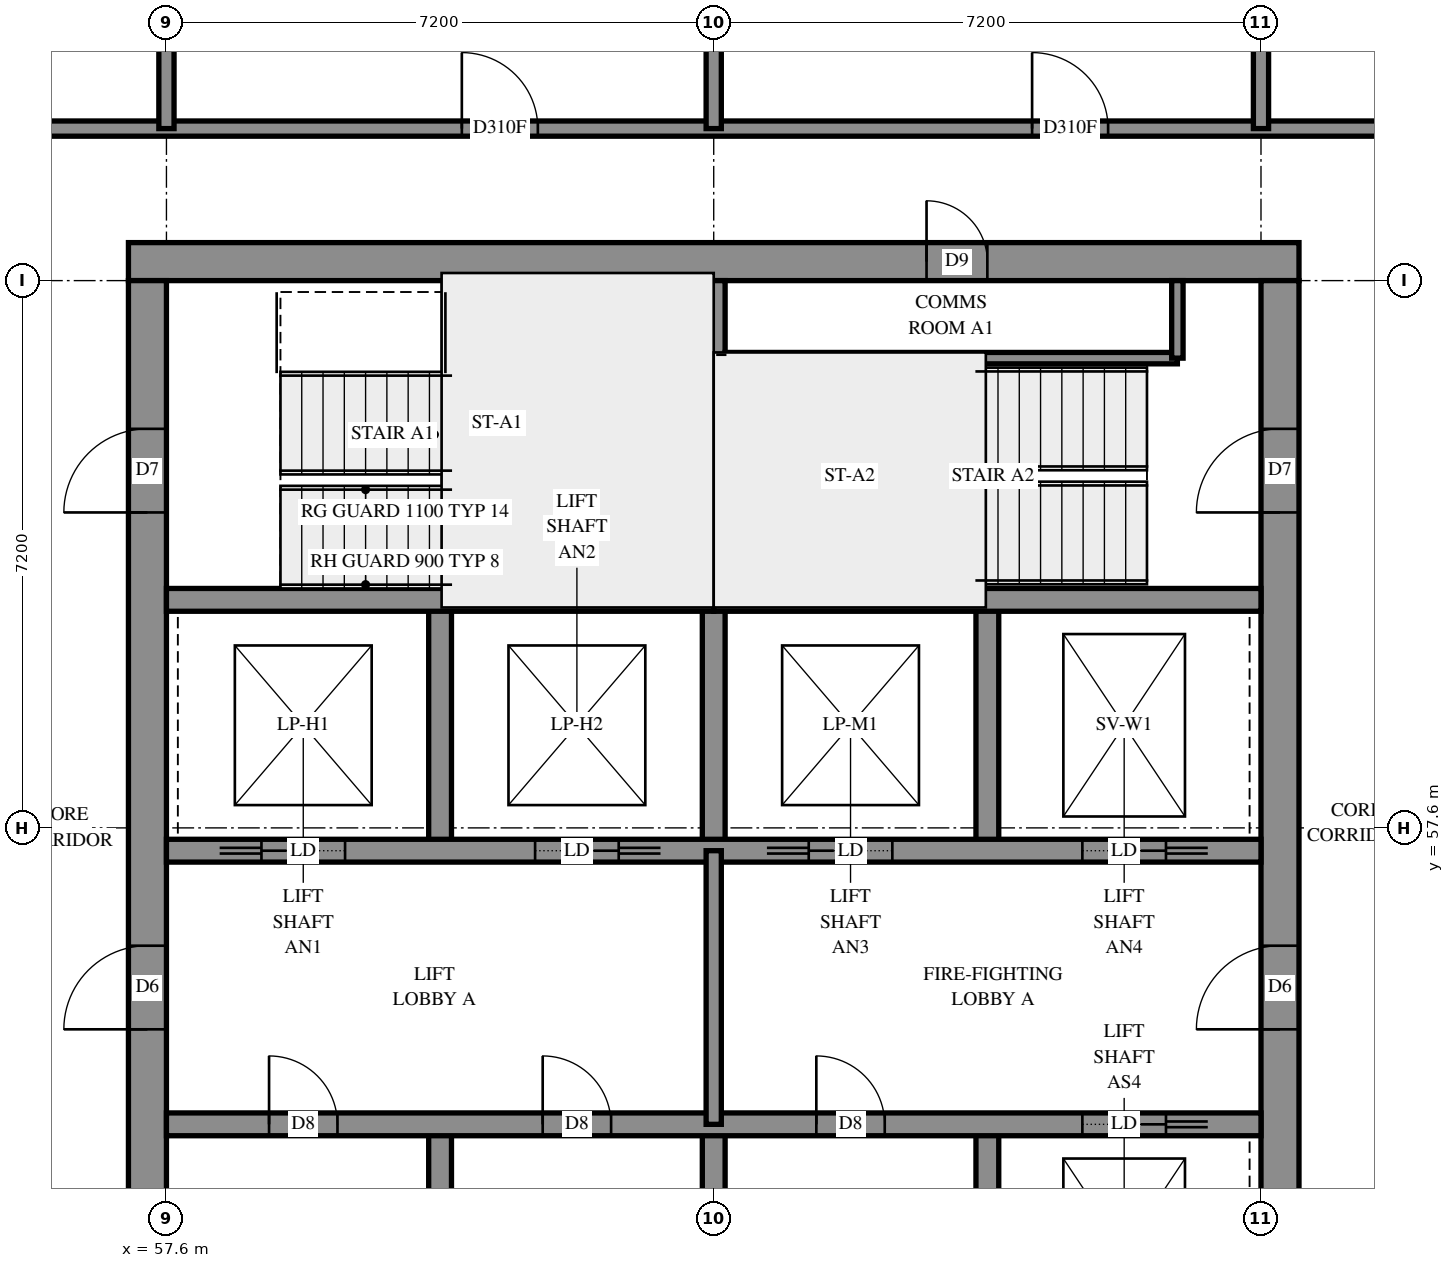
"""IFC4 building model, lengths in metres.
Left out: names, types, materials, properties, quantities, classifications, styles, units other than length and angle.
Written with IfcOpenShell. Run it as: python <this file> out.ifc"""

import sys

from ifc_helpers import new_model, si_unit, direction, frame, frame_2d, origin, place, context, subcontext, project, spatial, rectangle, extrude, element, fill, save


model = new_model("IFC4")
c1 = context("Model", 3, precision=1e-05, world=origin(), true_north=direction((0.0, 1.0)))
c2 = subcontext(c1, "Body", "Model", "MODEL_VIEW")
j1 = project(units=[si_unit("LENGTHUNIT", "METRE"), si_unit("PLANEANGLEUNIT", "RADIAN")], contexts=[c1])
p1 = place(None, origin())
s1 = spatial("IfcSite", under=j1, at=p1, CompositionType="ELEMENT")
p2 = place(p1, origin())
s2 = spatial("IfcBuilding", under=s1, at=p2, CompositionType="ELEMENT")
p3 = place(p2, frame((0.0, 0.0, 189.6)))
s3 = spatial("IfcBuildingStorey", under=s2, at=p3, CompositionType="ELEMENT", Elevation=189.6)
p4 = place(p3, frame((57.1, 65.05, -0.3), z_axis=(0.0, 0.0, 1.0), x_axis=(1.0, 0.0, 0.0)))
e1 = element("IfcWall", 1, at=p4, inside=s3, PredefinedType="SHEAR", context=c2, shape_type="SweptSolid", body=[
    extrude(rectangle(XDim=15.4, YDim=0.5, at=frame_2d((7.7, 0.0))), origin(), (0.0, 0.0, 1.0), 2.7),
])
p5 = place(p4, frame((10.5, 0.0, 0.3)))
e2 = element("IfcOpeningElement", 2, at=p5, cuts=e1, PredefinedType="OPENING", context=c2, shape_type="SweptSolid", body=[
    extrude(rectangle(XDim=0.8, YDim=2.1, at=frame_2d((0.4, 1.05))), frame((0.0, 0.26, 0.0), z_axis=(0.0, -1.0, 0.0), x_axis=(1.0, 0.0, 0.0)), (0.0, 0.0, 1.0), 0.52),
])
p6 = place(p3, frame((57.35, 50.4, -0.3), z_axis=(0.0, 0.0, 1.0), x_axis=(0.0, 1.0, 0.0)))
e3 = element("IfcWall", 3, at=p6, inside=s3, PredefinedType="SHEAR", context=c2, shape_type="SweptSolid", body=[
    extrude(rectangle(XDim=14.4, YDim=0.5, at=frame_2d((7.2, 0.0))), origin(), (0.0, 0.0, 1.0), 2.7),
])
p7 = place(p6, frame((4.55, 0.0, 0.3)))
e4 = element("IfcOpeningElement", 4, at=p7, cuts=e3, PredefinedType="OPENING", context=c2, shape_type="SweptSolid", body=[
    extrude(rectangle(XDim=1.1, YDim=2.1, at=frame_2d((0.55, 1.05))), frame((0.0, 0.26, 0.0), z_axis=(0.0, -1.0, 0.0), x_axis=(1.0, 0.0, 0.0)), (0.0, 0.0, 1.0), 0.52),
])
p8 = place(p6, frame((11.35, 0.0, 0.3)))
e5 = element("IfcOpeningElement", 5, at=p8, cuts=e3, PredefinedType="OPENING", context=c2, shape_type="SweptSolid", body=[
    extrude(rectangle(XDim=1.1, YDim=2.1, at=frame_2d((0.55, 1.05))), frame((0.0, 0.26, 0.0), z_axis=(0.0, -1.0, 0.0), x_axis=(1.0, 0.0, 0.0)), (0.0, 0.0, 1.0), 0.52),
])
p9 = place(p3, frame((72.25, 50.4, -0.3), z_axis=(0.0, 0.0, 1.0), x_axis=(0.0, 1.0, 0.0)))
e6 = element("IfcWall", 6, at=p9, inside=s3, PredefinedType="SHEAR", context=c2, shape_type="SweptSolid", body=[
    extrude(rectangle(XDim=14.4, YDim=0.5, at=frame_2d((7.2, 0.0))), origin(), (0.0, 0.0, 1.0), 2.7),
])
p10 = place(p9, frame((4.55, 0.0, 0.3)))
e7 = element("IfcOpeningElement", 7, at=p10, cuts=e6, PredefinedType="OPENING", context=c2, shape_type="SweptSolid", body=[
    extrude(rectangle(XDim=1.1, YDim=2.1, at=frame_2d((0.55, 1.05))), frame((0.0, 0.26, 0.0), z_axis=(0.0, -1.0, 0.0), x_axis=(1.0, 0.0, 0.0)), (0.0, 0.0, 1.0), 0.52),
])
p11 = place(p9, frame((11.35, 0.0, 0.3)))
e8 = element("IfcOpeningElement", 8, at=p11, cuts=e6, PredefinedType="OPENING", context=c2, shape_type="SweptSolid", body=[
    extrude(rectangle(XDim=1.1, YDim=2.1, at=frame_2d((0.55, 1.05))), frame((0.0, 0.26, 0.0), z_axis=(0.0, -1.0, 0.0), x_axis=(1.0, 0.0, 0.0)), (0.0, 0.0, 1.0), 0.52),
])
for number, where, z_axis, x_axis in (
    (9, (61.2, 50.4, 0.0), (0.0, 0.0, 1.0), (0.0, 1.0, 0.0)),
    (10, (61.2, 57.3, 0.0), (0.0, 0.0, 1.0), (0.0, 1.0, 0.0)),
    (11, (64.8, 50.4, 0.0), (0.0, 0.0, 1.0), (0.0, 1.0, 0.0)),
    (12, (64.8, 57.3, 0.0), (0.0, 0.0, 1.0), (0.0, 1.0, 0.0)),
    (13, (68.4, 50.4, 0.0), (0.0, 0.0, 1.0), (0.0, 1.0, 0.0)),
    (14, (68.4, 57.3, 0.0), (0.0, 0.0, 1.0), (0.0, 1.0, 0.0)),
):
    element("IfcWall", number, at=place(p3, frame(where, z_axis=z_axis, x_axis=x_axis)), inside=s3, PredefinedType="SOLIDWALL", context=c2, shape_type="SweptSolid", body=[
        extrude(rectangle(XDim=3.3, YDim=0.3, at=frame_2d((1.65, 0.0))), origin(), (0.0, 0.0, 1.0), 3.1),
    ])
p12 = place(p3, frame((57.6, 53.7, 0.0), z_axis=(0.0, 0.0, 1.0), x_axis=(1.0, 0.0, 0.0)))
e15 = element("IfcWall", 15, at=p12, inside=s3, PredefinedType="SOLIDWALL", context=c2, shape_type="SweptSolid", body=[
    extrude(rectangle(XDim=14.4, YDim=0.3, at=frame_2d((7.2, 0.0))), origin(), (0.0, 0.0, 1.0), 3.1),
])
p13 = place(p12, frame((1.35, 0.0, 0.0)))
e16 = element("IfcOpeningElement", 16, at=p13, cuts=e15, PredefinedType="OPENING", context=c2, shape_type="SweptSolid", body=[
    extrude(rectangle(XDim=0.9, YDim=2.1, at=frame_2d((0.45, 1.05))), frame((0.0, 0.16, 0.0), z_axis=(0.0, -1.0, 0.0), x_axis=(1.0, 0.0, 0.0)), (0.0, 0.0, 1.0), 0.32),
])
p14 = place(p12, frame((4.95, 0.0, 0.0)))
e17 = element("IfcOpeningElement", 17, at=p14, cuts=e15, PredefinedType="OPENING", context=c2, shape_type="SweptSolid", body=[
    extrude(rectangle(XDim=0.9, YDim=2.1, at=frame_2d((0.45, 1.05))), frame((0.0, 0.16, 0.0), z_axis=(0.0, -1.0, 0.0), x_axis=(1.0, 0.0, 0.0)), (0.0, 0.0, 1.0), 0.32),
])
p15 = place(p12, frame((8.55, 0.0, 0.0)))
e18 = element("IfcOpeningElement", 18, at=p15, cuts=e15, PredefinedType="OPENING", context=c2, shape_type="SweptSolid", body=[
    extrude(rectangle(XDim=0.9, YDim=2.1, at=frame_2d((0.45, 1.05))), frame((0.0, 0.16, 0.0), z_axis=(0.0, -1.0, 0.0), x_axis=(1.0, 0.0, 0.0)), (0.0, 0.0, 1.0), 0.32),
])
p16 = place(p12, frame((12.05, 0.0, 0.0)))
e19 = element("IfcOpeningElement", 19, at=p16, cuts=e15, PredefinedType="OPENING", context=c2, shape_type="SweptSolid", body=[
    extrude(rectangle(XDim=1.1, YDim=2.1, at=frame_2d((0.55, 1.05))), frame((0.0, 0.16, 0.0), z_axis=(0.0, -1.0, 0.0), x_axis=(1.0, 0.0, 0.0)), (0.0, 0.0, 1.0), 0.32),
])
p17 = place(p3, frame((57.6, 57.3, 0.0), z_axis=(0.0, 0.0, 1.0), x_axis=(1.0, 0.0, 0.0)))
e20 = element("IfcWall", 20, at=p17, inside=s3, PredefinedType="SOLIDWALL", context=c2, shape_type="SweptSolid", body=[
    extrude(rectangle(XDim=14.4, YDim=0.3, at=frame_2d((7.2, 0.0))), origin(), (0.0, 0.0, 1.0), 3.1),
])
p18 = place(p17, frame((1.25, 0.0, 0.0)))
e21 = element("IfcOpeningElement", 21, at=p18, cuts=e20, PredefinedType="OPENING", context=c2, shape_type="SweptSolid", body=[
    extrude(rectangle(XDim=1.1, YDim=2.1, at=frame_2d((0.55, 1.05))), frame((0.0, 0.16, 0.0), z_axis=(0.0, -1.0, 0.0), x_axis=(1.0, 0.0, 0.0)), (0.0, 0.0, 1.0), 0.32),
])
p19 = place(p17, frame((4.85, 0.0, 0.0)))
e22 = element("IfcOpeningElement", 22, at=p19, cuts=e20, PredefinedType="OPENING", context=c2, shape_type="SweptSolid", body=[
    extrude(rectangle(XDim=1.1, YDim=2.1, at=frame_2d((0.55, 1.05))), frame((0.0, 0.16, 0.0), z_axis=(0.0, -1.0, 0.0), x_axis=(1.0, 0.0, 0.0)), (0.0, 0.0, 1.0), 0.32),
])
p20 = place(p17, frame((8.45, 0.0, 0.0)))
e23 = element("IfcOpeningElement", 23, at=p20, cuts=e20, PredefinedType="OPENING", context=c2, shape_type="SweptSolid", body=[
    extrude(rectangle(XDim=1.1, YDim=2.1, at=frame_2d((0.55, 1.05))), frame((0.0, 0.16, 0.0), z_axis=(0.0, -1.0, 0.0), x_axis=(1.0, 0.0, 0.0)), (0.0, 0.0, 1.0), 0.32),
])
p21 = place(p17, frame((12.05, 0.0, 0.0)))
e24 = element("IfcOpeningElement", 24, at=p21, cuts=e20, PredefinedType="OPENING", context=c2, shape_type="SweptSolid", body=[
    extrude(rectangle(XDim=1.1, YDim=2.1, at=frame_2d((0.55, 1.05))), frame((0.0, 0.16, 0.0), z_axis=(0.0, -1.0, 0.0), x_axis=(1.0, 0.0, 0.0)), (0.0, 0.0, 1.0), 0.32),
])
for number, where, z_axis, x_axis in (
    (25, (57.6, 60.6, 0.0), (0.0, 0.0, 1.0), (1.0, 0.0, 0.0)),
    (26, (64.8, 60.6, 0.0), (0.0, 0.0, 1.0), (1.0, 0.0, 0.0)),
):
    element("IfcWall", number, at=place(p3, frame(where, z_axis=z_axis, x_axis=x_axis)), inside=s3, PredefinedType="SOLIDWALL", context=c2, shape_type="SweptSolid", body=[
        extrude(rectangle(XDim=7.2, YDim=0.3, at=frame_2d((3.6, 0.0))), origin(), (0.0, 0.0, 1.0), 3.1),
    ])
p22 = place(p3, frame((64.8, 60.6, 0.0), z_axis=(0.0, 0.0, 1.0), x_axis=(0.0, 1.0, 0.0)))
e27 = element("IfcWall", 27, at=p22, inside=s3, PredefinedType="SOLIDWALL", context=c2, shape_type="SweptSolid", body=[
    extrude(rectangle(XDim=4.2, YDim=0.3, at=frame_2d((2.1, 0.0))), origin(), (0.0, 0.0, 1.0), 3.1),
])
p23 = place(p3, frame((64.95, 63.78, 0.0), z_axis=(0.0, 0.0, 1.0), x_axis=(1.0, 0.0, 0.0)))
e28 = element("IfcWall", 28, at=p23, inside=s3, PredefinedType="PARTITIONING", context=c2, shape_type="SweptSolid", body=[
    extrude(rectangle(XDim=5.95, YDim=0.15, at=frame_2d((2.975, 0.0))), origin(), (0.0, 0.0, 1.0), 3.1),
])
p24 = place(p3, frame((70.9, 63.78, 0.0), z_axis=(0.0, 0.0, 1.0), x_axis=(0.0, 1.0, 0.0)))
e29 = element("IfcWall", 29, at=p24, inside=s3, PredefinedType="PARTITIONING", context=c2, shape_type="SweptSolid", body=[
    extrude(rectangle(XDim=1.02, YDim=0.15, at=frame_2d((0.51, 0.0))), origin(), (0.0, 0.0, 1.0), 3.1),
])
p25 = place(p3, frame((64.8, 53.7, 0.0), z_axis=(0.0, 0.0, 1.0), x_axis=(0.0, 1.0, 0.0)))
e30 = element("IfcWall", 30, at=p25, inside=s3, PredefinedType="PARTITIONING", context=c2, shape_type="SweptSolid", body=[
    extrude(rectangle(XDim=3.6, YDim=0.2, at=frame_2d((1.8, 0.0))), origin(), (0.0, 0.0, 1.0), 3.1),
])
p26 = place(p3, frame((55.6, 66.8, 0.0), z_axis=(0.0, 0.0, 1.0), x_axis=(1.0, 0.0, 0.0)))
e31 = element("IfcWall", 31, at=p26, inside=s3, PredefinedType="PARTITIONING", context=c2, shape_type="SweptSolid", body=[
    extrude(rectangle(XDim=18.4, YDim=0.2, at=frame_2d((9.2, 0.0))), origin(), (0.0, 0.0, 1.0), 3.1),
])
p27 = place(p26, frame((5.886, 0.0, 0.0)))
e32 = element("IfcOpeningElement", 32, at=p27, cuts=e31, PredefinedType="OPENING", context=c2, shape_type="SweptSolid", body=[
    extrude(rectangle(XDim=1.0, YDim=2.1, at=frame_2d((0.5, 1.05))), frame((0.0, 0.11, 0.0), z_axis=(0.0, -1.0, 0.0), x_axis=(1.0, 0.0, 0.0)), (0.0, 0.0, 1.0), 0.22),
])
p28 = place(p26, frame((13.389, 0.0, 0.0)))
e33 = element("IfcOpeningElement", 33, at=p28, cuts=e31, PredefinedType="OPENING", context=c2, shape_type="SweptSolid", body=[
    extrude(rectangle(XDim=1.0, YDim=2.1, at=frame_2d((0.5, 1.05))), frame((0.0, 0.11, 0.0), z_axis=(0.0, -1.0, 0.0), x_axis=(1.0, 0.0, 0.0)), (0.0, 0.0, 1.0), 0.22),
])
for number, where, z_axis, x_axis in (
    (34, (57.6, 66.8, 0.0), (0.0, 0.0, 1.0), (0.0, 1.0, 0.0)),
    (35, (64.8, 66.8, 0.0), (0.0, 0.0, 1.0), (0.0, 1.0, 0.0)),
):
    element("IfcWall", number, at=place(p3, frame(where, z_axis=z_axis, x_axis=x_axis)), inside=s3, PredefinedType="PARTITIONING", context=c2, shape_type="SweptSolid", body=[
        extrude(rectangle(XDim=4.8, YDim=0.2, at=frame_2d((2.4, 0.0))), origin(), (0.0, 0.0, 1.0), 3.1),
    ])
p29 = place(p3, frame((72.0, 66.8, 0.0), z_axis=(0.0, 0.0, 1.0), x_axis=(0.0, 1.0, 0.0)))
e36 = element("IfcWall", 36, at=p29, inside=s3, PredefinedType="PARTITIONING", context=c2, shape_type="SweptSolid", body=[
    extrude(rectangle(XDim=4.696, YDim=0.2, at=frame_2d((2.348, 0.0))), origin(), (0.0, 0.0, 1.0), 3.1),
])
p30 = place(p5, origin())
e37 = element("IfcDoor", 37, at=p30, inside=s3, OperationType="SINGLE_SWING_RIGHT", PredefinedType="DOOR", context=c2, shape_type="SweptSolid", body=[
    extrude(rectangle(XDim=0.8, YDim=2.1, at=frame_2d((0.4, 1.05))), frame((0.0, 0.025, 0.0), z_axis=(0.0, -1.0, 0.0), x_axis=(1.0, 0.0, 0.0)), (0.0, 0.0, 1.0), 0.05),
])
fill(e2, e37)
p31 = place(p7, origin())
e38 = element("IfcDoor", 38, at=p31, inside=s3, OperationType="DOUBLE_DOOR_SINGLE_SWING", PredefinedType="DOOR", context=c2, shape_type="SweptSolid", body=[
    extrude(rectangle(XDim=1.1, YDim=2.1, at=frame_2d((0.55, 1.05))), frame((0.0, 0.025, 0.0), z_axis=(0.0, -1.0, 0.0), x_axis=(1.0, 0.0, 0.0)), (0.0, 0.0, 1.0), 0.05),
])
fill(e4, e38)
p32 = place(p10, origin())
e39 = element("IfcDoor", 39, at=p32, inside=s3, OperationType="DOUBLE_DOOR_SINGLE_SWING", PredefinedType="DOOR", context=c2, shape_type="SweptSolid", body=[
    extrude(rectangle(XDim=1.1, YDim=2.1, at=frame_2d((0.55, 1.05))), frame((0.0, 0.025, 0.0), z_axis=(0.0, -1.0, 0.0), x_axis=(1.0, 0.0, 0.0)), (0.0, 0.0, 1.0), 0.05),
])
fill(e7, e39)
p33 = place(p8, origin())
e40 = element("IfcDoor", 40, at=p33, inside=s3, OperationType="SINGLE_SWING_LEFT", PredefinedType="DOOR", context=c2, shape_type="SweptSolid", body=[
    extrude(rectangle(XDim=1.1, YDim=2.1, at=frame_2d((0.55, 1.05))), frame((0.0, 0.025, 0.0), z_axis=(0.0, -1.0, 0.0), x_axis=(1.0, 0.0, 0.0)), (0.0, 0.0, 1.0), 0.05),
])
fill(e5, e40)
p34 = place(p11, origin())
e41 = element("IfcDoor", 41, at=p34, inside=s3, OperationType="SINGLE_SWING_RIGHT", PredefinedType="DOOR", context=c2, shape_type="SweptSolid", body=[
    extrude(rectangle(XDim=1.1, YDim=2.1, at=frame_2d((0.55, 1.05))), frame((0.0, 0.025, 0.0), z_axis=(0.0, -1.0, 0.0), x_axis=(1.0, 0.0, 0.0)), (0.0, 0.0, 1.0), 0.05),
])
fill(e8, e41)
p35 = place(p13, origin())
e42 = element("IfcDoor", 42, at=p35, inside=s3, OperationType="SINGLE_SWING_LEFT", PredefinedType="DOOR", context=c2, shape_type="SweptSolid", body=[
    extrude(rectangle(XDim=0.9, YDim=2.1, at=frame_2d((0.45, 1.05))), frame((0.0, 0.025, 0.0), z_axis=(0.0, -1.0, 0.0), x_axis=(1.0, 0.0, 0.0)), (0.0, 0.0, 1.0), 0.05),
])
fill(e16, e42)
p36 = place(p14, origin())
e43 = element("IfcDoor", 43, at=p36, inside=s3, OperationType="SINGLE_SWING_LEFT", PredefinedType="DOOR", context=c2, shape_type="SweptSolid", body=[
    extrude(rectangle(XDim=0.9, YDim=2.1, at=frame_2d((0.45, 1.05))), frame((0.0, 0.025, 0.0), z_axis=(0.0, -1.0, 0.0), x_axis=(1.0, 0.0, 0.0)), (0.0, 0.0, 1.0), 0.05),
])
fill(e17, e43)
p37 = place(p15, origin())
e44 = element("IfcDoor", 44, at=p37, inside=s3, OperationType="SINGLE_SWING_LEFT", PredefinedType="DOOR", context=c2, shape_type="SweptSolid", body=[
    extrude(rectangle(XDim=0.9, YDim=2.1, at=frame_2d((0.45, 1.05))), frame((0.0, 0.025, 0.0), z_axis=(0.0, -1.0, 0.0), x_axis=(1.0, 0.0, 0.0)), (0.0, 0.0, 1.0), 0.05),
])
fill(e18, e44)
p38 = place(p16, origin())
e45 = element("IfcDoor", 45, at=p38, inside=s3, OperationType="SLIDING_TO_RIGHT", PredefinedType="DOOR", context=c2, shape_type="SweptSolid", body=[
    extrude(rectangle(XDim=1.1, YDim=2.1, at=frame_2d((0.55, 1.05))), frame((0.0, 0.025, 0.0), z_axis=(0.0, -1.0, 0.0), x_axis=(1.0, 0.0, 0.0)), (0.0, 0.0, 1.0), 0.05),
])
fill(e19, e45)
p39 = place(p18, origin())
e46 = element("IfcDoor", 46, at=p39, inside=s3, OperationType="SLIDING_TO_LEFT", PredefinedType="DOOR", context=c2, shape_type="SweptSolid", body=[
    extrude(rectangle(XDim=1.1, YDim=2.1, at=frame_2d((0.55, 1.05))), frame((0.0, 0.025, 0.0), z_axis=(0.0, -1.0, 0.0), x_axis=(1.0, 0.0, 0.0)), (0.0, 0.0, 1.0), 0.05),
])
fill(e21, e46)
p40 = place(p19, origin())
e47 = element("IfcDoor", 47, at=p40, inside=s3, OperationType="SLIDING_TO_RIGHT", PredefinedType="DOOR", context=c2, shape_type="SweptSolid", body=[
    extrude(rectangle(XDim=1.1, YDim=2.1, at=frame_2d((0.55, 1.05))), frame((0.0, 0.025, 0.0), z_axis=(0.0, -1.0, 0.0), x_axis=(1.0, 0.0, 0.0)), (0.0, 0.0, 1.0), 0.05),
])
fill(e22, e47)
p41 = place(p20, origin())
e48 = element("IfcDoor", 48, at=p41, inside=s3, OperationType="SLIDING_TO_LEFT", PredefinedType="DOOR", context=c2, shape_type="SweptSolid", body=[
    extrude(rectangle(XDim=1.1, YDim=2.1, at=frame_2d((0.55, 1.05))), frame((0.0, 0.025, 0.0), z_axis=(0.0, -1.0, 0.0), x_axis=(1.0, 0.0, 0.0)), (0.0, 0.0, 1.0), 0.05),
])
fill(e23, e48)
p42 = place(p21, origin())
e49 = element("IfcDoor", 49, at=p42, inside=s3, OperationType="SLIDING_TO_RIGHT", PredefinedType="DOOR", context=c2, shape_type="SweptSolid", body=[
    extrude(rectangle(XDim=1.1, YDim=2.1, at=frame_2d((0.55, 1.05))), frame((0.0, 0.025, 0.0), z_axis=(0.0, -1.0, 0.0), x_axis=(1.0, 0.0, 0.0)), (0.0, 0.0, 1.0), 0.05),
])
fill(e24, e49)
p43 = place(p27, origin())
e50 = element("IfcDoor", 50, at=p43, inside=s3, OperationType="SINGLE_SWING_RIGHT", PredefinedType="DOOR", context=c2, shape_type="SweptSolid", body=[
    extrude(rectangle(XDim=1.0, YDim=2.1, at=frame_2d((0.5, 1.05))), frame((0.0, 0.025, 0.0), z_axis=(0.0, -1.0, 0.0), x_axis=(1.0, 0.0, 0.0)), (0.0, 0.0, 1.0), 0.05),
])
fill(e32, e50)
p44 = place(p28, origin())
e51 = element("IfcDoor", 51, at=p44, inside=s3, OperationType="SINGLE_SWING_RIGHT", PredefinedType="DOOR", context=c2, shape_type="SweptSolid", body=[
    extrude(rectangle(XDim=1.0, YDim=2.1, at=frame_2d((0.5, 1.05))), frame((0.0, 0.025, 0.0), z_axis=(0.0, -1.0, 0.0), x_axis=(1.0, 0.0, 0.0)), (0.0, 0.0, 1.0), 0.05),
])
fill(e33, e51)
save(model, sys.argv[1])
